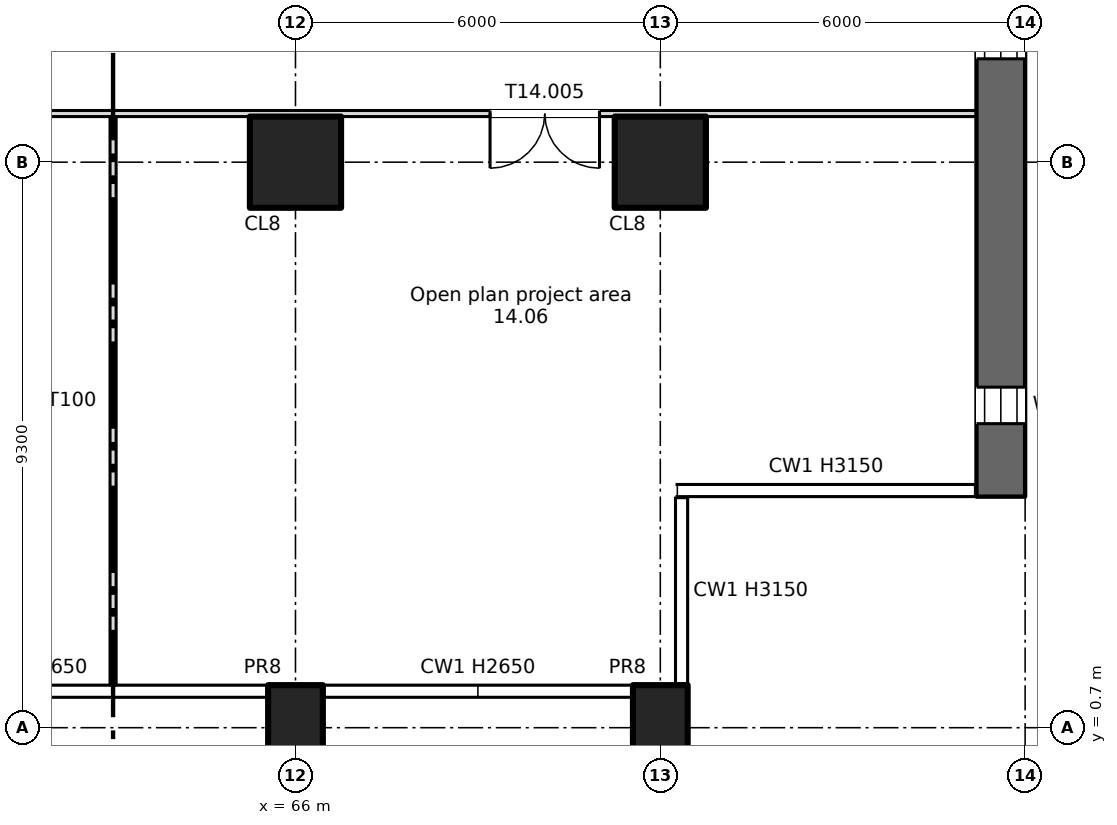
"""IFC4 building model, lengths in metres.
Left out: names, types, materials, properties, quantities, classifications, styles, units other than length and angle.
Written with IfcOpenShell. Run it as: python <this file> out.ifc"""

import sys

from ifc_helpers import new_model, si_unit, direction, frame, frame_2d, origin, origin_2d, place, context, subcontext, project, spatial, rectangle, extrude, element, fill, save


model = new_model("IFC4")
c1 = context("Model", 3, precision=1e-05, world=origin(), true_north=direction((0.0, 1.0)))
c2 = subcontext(c1, "Body", "Model", "MODEL_VIEW")
j1 = project(units=[si_unit("LENGTHUNIT", "METRE"), si_unit("PLANEANGLEUNIT", "RADIAN")], contexts=[c1])
p1 = place(None, origin())
s1 = spatial("IfcSite", under=j1, at=p1, CompositionType="ELEMENT")
p2 = place(p1, origin())
s2 = spatial("IfcBuilding", under=s1, at=p2, CompositionType="ELEMENT")
p3 = place(p2, frame((0.0, 0.0, 86.25)))
s3 = spatial("IfcBuildingStorey", under=s2, at=p3, CompositionType="ELEMENT", Elevation=86.25)
for number, where, z_axis, x_axis in (
    (1, (66.0, 0.7, -0.4), (0.0, 0.0, 1.0), (1.0, 0.0, 0.0)),
    (2, (72.0, 0.7, -0.4), (0.0, 0.0, 1.0), (1.0, 0.0, 0.0)),
):
    element("IfcColumn", number, at=place(p3, frame(where, z_axis=z_axis, x_axis=x_axis)), inside=s3, PredefinedType="COLUMN", context=c2, shape_type="SweptSolid", body=[
        extrude(rectangle(XDim=0.9, YDim=1.4, at=origin_2d()), origin(), (0.0, 0.0, 1.0), 3.55),
    ])
for number, where, z_axis, x_axis in (
    (3, (66.0, 10.0, 0.0), (0.0, 0.0, 1.0), (1.0, 0.0, 0.0)),
    (4, (72.0, 10.0, 0.0), (0.0, 0.0, 1.0), (1.0, 0.0, 0.0)),
):
    element("IfcColumn", number, at=place(p3, frame(where, z_axis=z_axis, x_axis=x_axis)), inside=s3, PredefinedType="COLUMN", context=c2, shape_type="SweptSolid", body=[
        extrude(rectangle(XDim=1.5, YDim=1.5, at=origin_2d()), origin(), (0.0, 0.0, 1.0), 3.15),
    ])
p4 = place(p3, frame((77.6, 4.5, 0.0), z_axis=(0.0, 0.0, 1.0), x_axis=(0.0, 1.0, 0.0)))
e5 = element("IfcWall", 5, at=p4, inside=s3, PredefinedType="SHEAR", context=c2, shape_type="SweptSolid", body=[
    extrude(rectangle(XDim=37.0, YDim=0.8, at=frame_2d((18.5, 0.0))), origin(), (0.0, 0.0, 1.0), 3.15),
])
p5 = place(p4, frame((1.2, 0.0, 0.6)))
e6 = element("IfcOpeningElement", 6, at=p5, cuts=e5, PredefinedType="OPENING", context=c2, shape_type="SweptSolid", body=[
    extrude(rectangle(XDim=0.6, YDim=2.4, at=frame_2d((0.3, 1.2))), frame((0.0, 0.41, 0.0), z_axis=(0.0, -1.0, 0.0), x_axis=(1.0, 0.0, 0.0)), (0.0, 0.0, 1.0), 0.82),
])
p6 = place(p4, frame((7.2, 0.0, 0.6)))
e7 = element("IfcOpeningElement", 7, at=p6, cuts=e5, PredefinedType="OPENING", context=c2, shape_type="SweptSolid", body=[
    extrude(rectangle(XDim=0.6, YDim=2.4, at=frame_2d((0.3, 1.2))), frame((0.0, 0.41, 0.0), z_axis=(0.0, -1.0, 0.0), x_axis=(1.0, 0.0, 0.0)), (0.0, 0.0, 1.0), 0.82),
])
p7 = place(p4, frame((13.2, 0.0, 0.6)))
e8 = element("IfcOpeningElement", 8, at=p7, cuts=e5, PredefinedType="OPENING", context=c2, shape_type="SweptSolid", body=[
    extrude(rectangle(XDim=0.6, YDim=2.4, at=frame_2d((0.3, 1.2))), frame((0.0, 0.41, 0.0), z_axis=(0.0, -1.0, 0.0), x_axis=(1.0, 0.0, 0.0)), (0.0, 0.0, 1.0), 0.82),
])
p8 = place(p4, frame((19.2, 0.0, 0.6)))
e9 = element("IfcOpeningElement", 9, at=p8, cuts=e5, PredefinedType="OPENING", context=c2, shape_type="SweptSolid", body=[
    extrude(rectangle(XDim=0.6, YDim=2.4, at=frame_2d((0.3, 1.2))), frame((0.0, 0.41, 0.0), z_axis=(0.0, -1.0, 0.0), x_axis=(1.0, 0.0, 0.0)), (0.0, 0.0, 1.0), 0.82),
])
p9 = place(p4, frame((25.2, 0.0, 0.6)))
e10 = element("IfcOpeningElement", 10, at=p9, cuts=e5, PredefinedType="OPENING", context=c2, shape_type="SweptSolid", body=[
    extrude(rectangle(XDim=0.6, YDim=2.4, at=frame_2d((0.3, 1.2))), frame((0.0, 0.41, 0.0), z_axis=(0.0, -1.0, 0.0), x_axis=(1.0, 0.0, 0.0)), (0.0, 0.0, 1.0), 0.82),
])
p10 = place(p4, frame((31.2, 0.0, 0.6)))
e11 = element("IfcOpeningElement", 11, at=p10, cuts=e5, PredefinedType="OPENING", context=c2, shape_type="SweptSolid", body=[
    extrude(rectangle(XDim=0.6, YDim=2.4, at=frame_2d((0.3, 1.2))), frame((0.0, 0.41, 0.0), z_axis=(0.0, -1.0, 0.0), x_axis=(1.0, 0.0, 0.0)), (0.0, 0.0, 1.0), 0.82),
])
p11 = place(p3, frame((0.8, 10.8, 0.0), z_axis=(0.0, 0.0, 1.0), x_axis=(1.0, 0.0, 0.0)))
e12 = element("IfcWall", 12, at=p11, inside=s3, PredefinedType="PARTITIONING", context=c2, shape_type="SweptSolid", body=[
    extrude(rectangle(XDim=76.4, YDim=0.1, at=frame_2d((38.2, 0.0))), origin(), (0.0, 0.0, 1.0), 3.15),
])
p12 = place(p11, frame((14.55, 0.0, 0.0)))
e13 = element("IfcOpeningElement", 13, at=p12, cuts=e12, PredefinedType="OPENING", context=c2, shape_type="SweptSolid", body=[
    extrude(rectangle(XDim=1.8, YDim=2.1, at=frame_2d((0.9, 1.05))), frame((0.0, 0.06, 0.0), z_axis=(0.0, -1.0, 0.0), x_axis=(1.0, 0.0, 0.0)), (0.0, 0.0, 1.0), 0.12),
])
p13 = place(p11, frame((26.55, 0.0, 0.0)))
e14 = element("IfcOpeningElement", 14, at=p13, cuts=e12, PredefinedType="OPENING", context=c2, shape_type="SweptSolid", body=[
    extrude(rectangle(XDim=1.8, YDim=2.1, at=frame_2d((0.9, 1.05))), frame((0.0, 0.06, 0.0), z_axis=(0.0, -1.0, 0.0), x_axis=(1.0, 0.0, 0.0)), (0.0, 0.0, 1.0), 0.12),
])
p14 = place(p11, frame((38.55, 0.0, 0.0)))
e15 = element("IfcOpeningElement", 15, at=p14, cuts=e12, PredefinedType="OPENING", context=c2, shape_type="SweptSolid", body=[
    extrude(rectangle(XDim=1.8, YDim=2.1, at=frame_2d((0.9, 1.05))), frame((0.0, 0.06, 0.0), z_axis=(0.0, -1.0, 0.0), x_axis=(1.0, 0.0, 0.0)), (0.0, 0.0, 1.0), 0.12),
])
p15 = place(p11, frame((54.05, 0.0, 0.0)))
e16 = element("IfcOpeningElement", 16, at=p15, cuts=e12, PredefinedType="OPENING", context=c2, shape_type="SweptSolid", body=[
    extrude(rectangle(XDim=1.8, YDim=2.1, at=frame_2d((0.9, 1.05))), frame((0.0, 0.06, 0.0), z_axis=(0.0, -1.0, 0.0), x_axis=(1.0, 0.0, 0.0)), (0.0, 0.0, 1.0), 0.12),
])
p16 = place(p11, frame((68.4, 0.0, 0.0)))
e17 = element("IfcOpeningElement", 17, at=p16, cuts=e12, PredefinedType="OPENING", context=c2, shape_type="SweptSolid", body=[
    extrude(rectangle(XDim=1.8, YDim=2.1, at=frame_2d((0.9, 1.05))), frame((0.0, 0.06, 0.0), z_axis=(0.0, -1.0, 0.0), x_axis=(1.0, 0.0, 0.0)), (0.0, 0.0, 1.0), 0.12),
])
p17 = place(p11, frame((2.45, 0.0, 0.0)))
e18 = element("IfcOpeningElement", 18, at=p17, cuts=e12, PredefinedType="OPENING", context=c2, shape_type="SweptSolid", body=[
    extrude(rectangle(XDim=1.8, YDim=2.1, at=frame_2d((0.9, 1.05))), frame((0.0, 0.06, 0.0), z_axis=(0.0, -1.0, 0.0), x_axis=(1.0, 0.0, 0.0)), (0.0, 0.0, 1.0), 0.12),
])
p18 = place(p3, frame((63.0, 1.4, 0.0), z_axis=(0.0, 0.0, 1.0), x_axis=(0.0, 1.0, 0.0)))
e19 = element("IfcWall", 19, at=p18, inside=s3, PredefinedType="PARTITIONING", context=c2, shape_type="SweptSolid", body=[
    extrude(rectangle(XDim=9.35, YDim=0.1, at=frame_2d((4.675, 0.0))), origin(), (0.0, 0.0, 1.0), 3.15),
])
p19 = place(p5, origin())
e20 = element("IfcWindow", 20, at=p19, inside=s3, PartitioningType="SINGLE_PANEL", PredefinedType="WINDOW", context=c2, shape_type="SweptSolid", body=[
    extrude(rectangle(XDim=0.6, YDim=2.4, at=frame_2d((0.3, 1.2))), frame((0.0, 0.03, 0.0), z_axis=(0.0, -1.0, 0.0), x_axis=(1.0, 0.0, 0.0)), (0.0, 0.0, 1.0), 0.06),
])
fill(e6, e20)
p20 = place(p6, origin())
e21 = element("IfcWindow", 21, at=p20, inside=s3, PartitioningType="SINGLE_PANEL", PredefinedType="WINDOW", context=c2, shape_type="SweptSolid", body=[
    extrude(rectangle(XDim=0.6, YDim=2.4, at=frame_2d((0.3, 1.2))), frame((0.0, 0.03, 0.0), z_axis=(0.0, -1.0, 0.0), x_axis=(1.0, 0.0, 0.0)), (0.0, 0.0, 1.0), 0.06),
])
fill(e7, e21)
p21 = place(p16, origin())
e22 = element("IfcDoor", 22, at=p21, inside=s3, OperationType="DOUBLE_DOOR_SINGLE_SWING", PredefinedType="DOOR", context=c2, shape_type="SweptSolid", body=[
    extrude(rectangle(XDim=1.8, YDim=2.1, at=frame_2d((0.9, 1.05))), frame((0.0, 0.025, 0.0), z_axis=(0.0, -1.0, 0.0), x_axis=(1.0, 0.0, 0.0)), (0.0, 0.0, 1.0), 0.05),
])
fill(e17, e22)
save(model, sys.argv[1])
